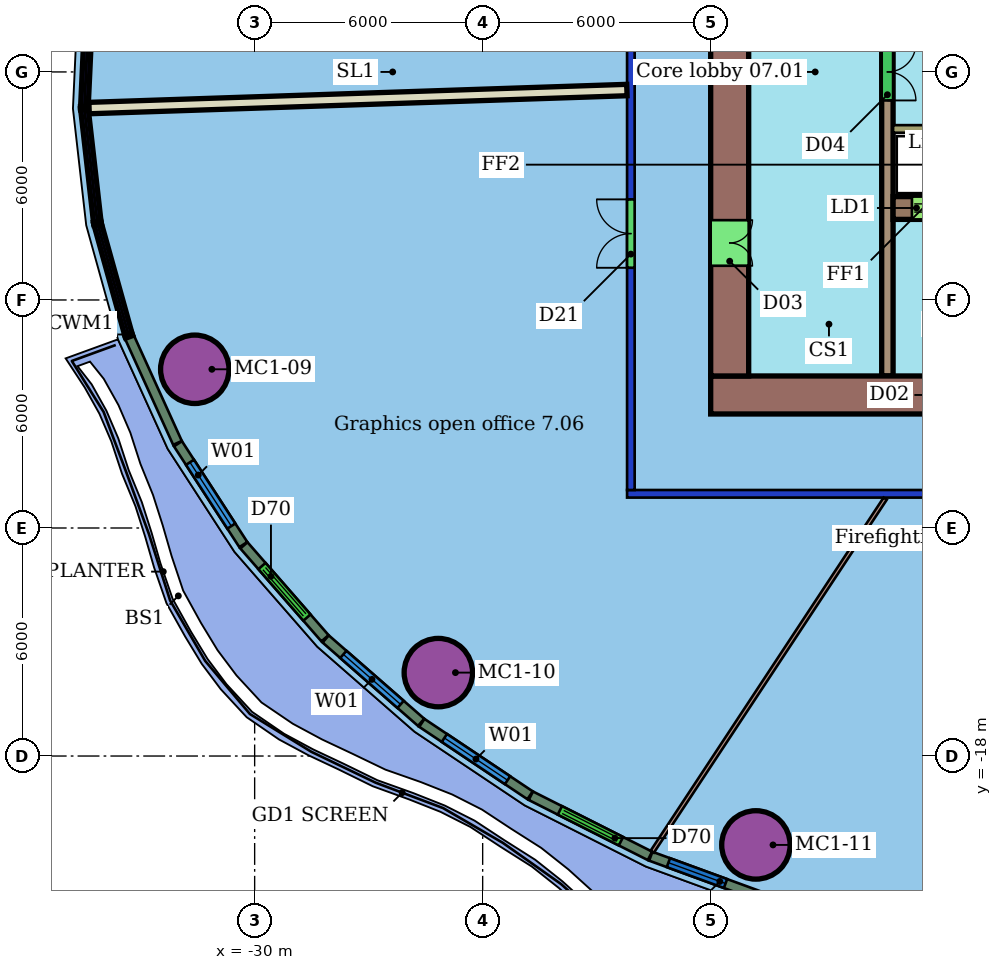
"""IFC4 building model, lengths in metres.
Left out: names, types, materials, properties, quantities, classifications, styles, units other than length and angle.
Written with IfcOpenShell. Run it as: python <this file> out.ifc"""

import sys

from ifc_helpers import new_model, si_unit, direction, frame, frame_2d, origin, origin_2d, place, context, subcontext, project, spatial, rectangle, hollow_circle, extrude, element, fill, save


model = new_model("IFC4")
c1 = context("Model", 3, precision=1e-05, world=origin(), true_north=direction((0.0, 1.0)))
c2 = subcontext(c1, "Body", "Model", "MODEL_VIEW")
j1 = project(units=[si_unit("LENGTHUNIT", "METRE"), si_unit("PLANEANGLEUNIT", "RADIAN")], contexts=[c1])
p1 = place(None, origin())
s1 = spatial("IfcSite", under=j1, at=p1, CompositionType="ELEMENT")
p2 = place(p1, origin())
s2 = spatial("IfcBuilding", under=s1, at=p2, CompositionType="ELEMENT")
p3 = place(p2, frame((0.0, 0.0, 43.4)))
s3 = spatial("IfcBuildingStorey", under=s2, at=p3, CompositionType="ELEMENT", Elevation=43.4)
for number, where, z_axis, x_axis in (
    (1, (-31.575, -7.824, 0.0), (0.0, 0.0, 1.0), (1.0, 0.0, 0.0)),
    (2, (-25.166, -15.805, 0.0), (0.0, 0.0, 1.0), (1.0, 0.0, 0.0)),
    (3, (-16.81, -20.339, 0.0), (0.0, 0.0, 1.0), (1.0, 0.0, 0.0)),
):
    element("IfcColumn", number, at=place(p3, frame(where, z_axis=z_axis, x_axis=x_axis)), inside=s3, PredefinedType="COLUMN", context=c2, shape_type="SweptSolid", body=[
        extrude(hollow_circle(Radius=0.9, WallThickness=0.06, at=origin_2d()), origin(), (0.0, 0.0, 1.0), 3.55),
    ])
p4 = place(p3, frame((8.2, -11.1, 0.0), z_axis=(0.0, 0.0, 1.0), x_axis=(-1.0, 0.0, 0.0)))
e4 = element("IfcWall", 4, at=p4, inside=s3, PredefinedType="PARTITIONING", context=c2, shape_type="SweptSolid", body=[
    extrude(rectangle(XDim=28.4, YDim=0.2, at=frame_2d((14.2, 0.0))), origin(), (0.0, 0.0, 1.0), 2.85),
])
p5 = place(p4, frame((11.713, 0.0, 0.0)))
e5 = element("IfcOpeningElement", 5, at=p5, cuts=e4, PredefinedType="OPENING", context=c2, shape_type="SweptSolid", body=[
    extrude(rectangle(XDim=1.8, YDim=2.1, at=frame_2d((0.9, 1.05))), frame((0.0, 0.11, 0.0), z_axis=(0.0, -1.0, 0.0), x_axis=(1.0, 0.0, 0.0)), (0.0, 0.0, 1.0), 0.22),
])
p6 = place(p4, frame((4.186, 0.0, 0.0)))
e6 = element("IfcOpeningElement", 6, at=p6, cuts=e4, PredefinedType="OPENING", context=c2, shape_type="SweptSolid", body=[
    extrude(rectangle(XDim=1.8, YDim=2.1, at=frame_2d((0.9, 1.05))), frame((0.0, 0.11, 0.0), z_axis=(0.0, -1.0, 0.0), x_axis=(1.0, 0.0, 0.0)), (0.0, 0.0, 1.0), 0.22),
])
p7 = place(p3, frame((-20.1, -11.0, 0.0), z_axis=(0.0, 0.0, 1.0), x_axis=(0.0, 1.0, 0.0)))
e7 = element("IfcWall", 7, at=p7, inside=s3, PredefinedType="PARTITIONING", context=c2, shape_type="SweptSolid", body=[
    extrude(rectangle(XDim=22.0, YDim=0.2, at=frame_2d((11.0, 0.0))), origin(), (0.0, 0.0, 1.0), 2.85),
])
p8 = place(p7, frame((12.87, 0.0, 0.0)))
e8 = element("IfcOpeningElement", 8, at=p8, cuts=e7, PredefinedType="OPENING", context=c2, shape_type="SweptSolid", body=[
    extrude(rectangle(XDim=1.1, YDim=2.1, at=frame_2d((0.55, 1.05))), frame((0.0, 0.11, 0.0), z_axis=(0.0, -1.0, 0.0), x_axis=(1.0, 0.0, 0.0)), (0.0, 0.0, 1.0), 0.22),
])
p9 = place(p7, frame((5.847, 0.0, 0.0)))
e9 = element("IfcOpeningElement", 9, at=p9, cuts=e7, PredefinedType="OPENING", context=c2, shape_type="SweptSolid", body=[
    extrude(rectangle(XDim=1.8, YDim=2.1, at=frame_2d((0.9, 1.05))), frame((0.0, 0.11, 0.0), z_axis=(0.0, -1.0, 0.0), x_axis=(1.0, 0.0, 0.0)), (0.0, 0.0, 1.0), 0.22),
])
p10 = place(p3, frame((-34.357, -0.951, 0.0), z_axis=(0.0, 0.0, 1.0), x_axis=(0.999438092699, 0.033518634559, 0.0)))
e10 = element("IfcWall", 10, at=p10, inside=s3, PredefinedType="PARTITIONING", context=c2, shape_type="SweptSolid", body=[
    extrude(rectangle(XDim=14.16, YDim=0.3, at=frame_2d((7.08, 0.0))), origin(), (0.0, 0.0, 1.0), 3.55),
])
p11 = place(p3, frame((-19.537, -20.518, 0.0), z_axis=(0.0, 0.0, 1.0), x_axis=(0.550715074496, 0.834693300993, 0.0)))
e11 = element("IfcWall", 11, at=p11, inside=s3, PredefinedType="PARTITIONING", context=c2, shape_type="SweptSolid", body=[
    extrude(rectangle(XDim=11.13, YDim=0.1, at=frame_2d((5.565, 0.0))), origin(), (0.0, 0.0, 1.0), 3.55),
])
p12 = place(p3, frame((-33.292, -6.983, 0.0), z_axis=(0.0, 0.0, 1.0), x_axis=(0.413441056797, -0.910530885008, 0.0)))
e12 = element("IfcWall", 12, at=p12, inside=s3, PredefinedType="SOLIDWALL", context=c2, shape_type="SweptSolid", body=[
    extrude(rectangle(XDim=3.05, YDim=0.25, at=frame_2d((1.525, 0.0))), origin(), (0.0, 0.0, 1.0), 3.15),
])
p13 = place(p3, frame((-32.018, -9.784, 0.0), z_axis=(0.0, 0.0, 1.0), x_axis=(0.544086790483, -0.839028941349, 0.0)))
e13 = element("IfcWall", 13, at=p13, inside=s3, PredefinedType="SOLIDWALL", context=c2, shape_type="SweptSolid", body=[
    extrude(rectangle(XDim=3.161, YDim=0.25, at=frame_2d((1.581, 0.0))), origin(), (0.0, 0.0, 1.0), 3.15),
])
p14 = place(p13, frame((0.581, 0.0, 0.8)))
e14 = element("IfcOpeningElement", 14, at=p14, cuts=e13, PredefinedType="OPENING", context=c2, shape_type="SweptSolid", body=[
    extrude(rectangle(XDim=2.0, YDim=2.2, at=frame_2d((1.0, 1.1))), frame((0.0, 0.135, 0.0), z_axis=(0.0, -1.0, 0.0), x_axis=(1.0, 0.0, 0.0)), (0.0, 0.0, 1.0), 0.27),
])
p15 = place(p3, frame((-30.282, -12.457, 0.0), z_axis=(0.0, 0.0, 1.0), x_axis=(0.657550554533, -0.753410424824, 0.0)))
e15 = element("IfcWall", 15, at=p15, inside=s3, PredefinedType="SOLIDWALL", context=c2, shape_type="SweptSolid", body=[
    extrude(rectangle(XDim=3.245, YDim=0.25, at=frame_2d((1.622, 0.0))), origin(), (0.0, 0.0, 1.0), 3.15),
])
p16 = place(p15, frame((0.722, 0.0, 0.0)))
e16 = element("IfcOpeningElement", 16, at=p16, cuts=e15, PredefinedType="OPENING", context=c2, shape_type="SweptSolid", body=[
    extrude(rectangle(XDim=1.8, YDim=2.4, at=frame_2d((0.9, 1.2))), frame((0.0, 0.135, 0.0), z_axis=(0.0, -1.0, 0.0), x_axis=(1.0, 0.0, 0.0)), (0.0, 0.0, 1.0), 0.27),
])
p17 = place(p3, frame((-28.131, -14.919, 0.0), z_axis=(0.0, 0.0, 1.0), x_axis=(0.753152288186, -0.657846206039, 0.0)))
e17 = element("IfcWall", 17, at=p17, inside=s3, PredefinedType="SOLIDWALL", context=c2, shape_type="SweptSolid", body=[
    extrude(rectangle(XDim=3.335, YDim=0.25, at=frame_2d((1.667, 0.0))), origin(), (0.0, 0.0, 1.0), 3.15),
])
p18 = place(p17, frame((0.618, 0.0, 0.8)))
e18 = element("IfcOpeningElement", 18, at=p18, cuts=e17, PredefinedType="OPENING", context=c2, shape_type="SweptSolid", body=[
    extrude(rectangle(XDim=2.0, YDim=2.2, at=frame_2d((1.0, 1.1))), frame((0.0, 0.135, 0.0), z_axis=(0.0, -1.0, 0.0), x_axis=(1.0, 0.0, 0.0)), (0.0, 0.0, 1.0), 0.27),
])
p19 = place(p3, frame((-25.6, -17.128, 0.0), z_axis=(0.0, 0.0, 1.0), x_axis=(0.831183264566, -0.555998543798, 0.0)))
e19 = element("IfcWall", 19, at=p19, inside=s3, PredefinedType="SOLIDWALL", context=c2, shape_type="SweptSolid", body=[
    extrude(rectangle(XDim=3.426, YDim=0.25, at=frame_2d((1.713, 0.0))), origin(), (0.0, 0.0, 1.0), 3.15),
])
p20 = place(p19, frame((0.713, 0.0, 0.8)))
e20 = element("IfcOpeningElement", 20, at=p20, cuts=e19, PredefinedType="OPENING", context=c2, shape_type="SweptSolid", body=[
    extrude(rectangle(XDim=2.0, YDim=2.2, at=frame_2d((1.0, 1.1))), frame((0.0, 0.135, 0.0), z_axis=(0.0, -1.0, 0.0), x_axis=(1.0, 0.0, 0.0)), (0.0, 0.0, 1.0), 0.27),
])
p21 = place(p3, frame((-22.732, -19.045, 0.0), z_axis=(0.0, 0.0, 1.0), x_axis=(0.892738680503, -0.450574797712, 0.0)))
e21 = element("IfcWall", 21, at=p21, inside=s3, PredefinedType="SOLIDWALL", context=c2, shape_type="SweptSolid", body=[
    extrude(rectangle(XDim=3.512, YDim=0.25, at=frame_2d((1.756, 0.0))), origin(), (0.0, 0.0, 1.0), 3.15),
])
p22 = place(p21, frame((0.856, 0.0, 0.0)))
e22 = element("IfcOpeningElement", 22, at=p22, cuts=e21, PredefinedType="OPENING", context=c2, shape_type="SweptSolid", body=[
    extrude(rectangle(XDim=1.8, YDim=2.4, at=frame_2d((0.9, 1.2))), frame((0.0, 0.135, 0.0), z_axis=(0.0, -1.0, 0.0), x_axis=(1.0, 0.0, 0.0)), (0.0, 0.0, 1.0), 0.27),
])
p23 = place(p3, frame((-19.576, -20.636, 0.0), z_axis=(0.0, 0.0, 1.0), x_axis=(0.939175868645, -0.343436584766, 0.0)))
e23 = element("IfcWall", 23, at=p23, inside=s3, PredefinedType="SOLIDWALL", context=c2, shape_type="SweptSolid", body=[
    extrude(rectangle(XDim=3.587, YDim=0.25, at=frame_2d((1.793, 0.0))), origin(), (0.0, 0.0, 1.0), 3.15),
])
p24 = place(p23, frame((0.494, 0.0, 0.8)))
e24 = element("IfcOpeningElement", 24, at=p24, cuts=e23, PredefinedType="OPENING", context=c2, shape_type="SweptSolid", body=[
    extrude(rectangle(XDim=1.6, YDim=2.2, at=frame_2d((0.8, 1.1))), frame((0.0, 0.135, 0.0), z_axis=(0.0, -1.0, 0.0), x_axis=(1.0, 0.0, 0.0)), (0.0, 0.0, 1.0), 0.27),
])
p25 = place(p3, frame((-18.0, -8.5, 0.0), z_axis=(0.0, 0.0, 1.0), x_axis=(1.0, 0.0, 0.0)))
e25 = element("IfcWall", 25, at=p25, inside=s3, PredefinedType="SHEAR", context=c2, shape_type="SweptSolid", body=[
    extrude(rectangle(XDim=24.0, YDim=1.0, at=frame_2d((12.0, 0.0))), origin(), (0.0, 0.0, 1.0), 3.4),
])
p26 = place(p25, frame((6.0, 0.0, 0.0)))
e26 = element("IfcOpeningElement", 26, at=p26, cuts=e25, PredefinedType="OPENING", context=c2, shape_type="SweptSolid", body=[
    extrude(rectangle(XDim=1.2, YDim=2.1, at=frame_2d((0.6, 1.05))), frame((0.0, 0.51, 0.0), z_axis=(0.0, -1.0, 0.0), x_axis=(1.0, 0.0, 0.0)), (0.0, 0.0, 1.0), 1.02),
])
p27 = place(p3, frame((-17.5, 8.0, 0.0), z_axis=(0.0, 0.0, 1.0), x_axis=(0.0, -1.0, 0.0)))
e27 = element("IfcWall", 27, at=p27, inside=s3, PredefinedType="SHEAR", context=c2, shape_type="SweptSolid", body=[
    extrude(rectangle(XDim=16.0, YDim=1.0, at=frame_2d((8.0, 0.0))), origin(), (0.0, 0.0, 1.0), 3.4),
])
p28 = place(p27, frame((11.9, 0.0, 0.0)))
e28 = element("IfcOpeningElement", 28, at=p28, cuts=e27, PredefinedType="OPENING", context=c2, shape_type="SweptSolid", body=[
    extrude(rectangle(XDim=1.2, YDim=2.1, at=frame_2d((0.6, 1.05))), frame((0.0, 0.51, 0.0), z_axis=(0.0, -1.0, 0.0), x_axis=(1.0, 0.0, 0.0)), (0.0, 0.0, 1.0), 1.02),
])
p29 = place(p27, frame((2.9, 0.0, 0.0)))
e29 = element("IfcOpeningElement", 29, at=p29, cuts=e27, PredefinedType="OPENING", context=c2, shape_type="SweptSolid", body=[
    extrude(rectangle(XDim=1.2, YDim=2.1, at=frame_2d((0.6, 1.05))), frame((0.0, 0.51, 0.0), z_axis=(0.0, -1.0, 0.0), x_axis=(1.0, 0.0, 0.0)), (0.0, 0.0, 1.0), 1.02),
])
p30 = place(p3, frame((-13.2, -3.58, 0.0), z_axis=(0.0, 0.0, 1.0), x_axis=(1.0, 0.0, 0.0)))
e30 = element("IfcWall", 30, at=p30, inside=s3, PredefinedType="SHEAR", context=c2, shape_type="SweptSolid", body=[
    extrude(rectangle(XDim=7.2, YDim=0.6, at=frame_2d((3.6, 0.0))), origin(), (0.0, 0.0, 1.0), 3.4),
])
p31 = place(p30, frame((0.496, 0.0, 0.0)))
e31 = element("IfcOpeningElement", 31, at=p31, cuts=e30, PredefinedType="OPENING", context=c2, shape_type="SweptSolid", body=[
    extrude(rectangle(XDim=1.2, YDim=2.1, at=frame_2d((0.6, 1.05))), frame((0.0, 0.31, 0.0), z_axis=(0.0, -1.0, 0.0), x_axis=(1.0, 0.0, 0.0)), (0.0, 0.0, 1.0), 0.62),
])
p32 = place(p30, frame((2.938, 0.0, 0.0)))
e32 = element("IfcOpeningElement", 32, at=p32, cuts=e30, PredefinedType="OPENING", context=c2, shape_type="SweptSolid", body=[
    extrude(rectangle(XDim=1.2, YDim=2.1, at=frame_2d((0.6, 1.05))), frame((0.0, 0.31, 0.0), z_axis=(0.0, -1.0, 0.0), x_axis=(1.0, 0.0, 0.0)), (0.0, 0.0, 1.0), 0.62),
])
p33 = place(p3, frame((-13.35, 8.0, 0.0), z_axis=(0.0, 0.0, 1.0), x_axis=(0.0, -1.0, 0.0)))
e33 = element("IfcWall", 33, at=p33, inside=s3, PredefinedType="SHEAR", context=c2, shape_type="SweptSolid", body=[
    extrude(rectangle(XDim=16.0, YDim=0.3, at=frame_2d((8.0, 0.0))), origin(), (0.0, 0.0, 1.0), 3.4),
])
p34 = place(p33, frame((7.25, 0.0, 0.0)))
e34 = element("IfcOpeningElement", 34, at=p34, cuts=e33, PredefinedType="OPENING", context=c2, shape_type="SweptSolid", body=[
    extrude(rectangle(XDim=1.5, YDim=2.1, at=frame_2d((0.75, 1.05))), frame((0.0, 0.16, 0.0), z_axis=(0.0, -1.0, 0.0), x_axis=(1.0, 0.0, 0.0)), (0.0, 0.0, 1.0), 0.32),
])
p35 = place(p3, frame((1.2, -1.5, 0.0), z_axis=(0.0, 0.0, 1.0), x_axis=(-1.0, 0.0, 0.0)))
e35 = element("IfcWall", 35, at=p35, inside=s3, PredefinedType="SHEAR", context=c2, shape_type="SweptSolid", body=[
    extrude(rectangle(XDim=14.4, YDim=0.2, at=frame_2d((7.2, 0.0))), origin(), (0.0, 0.0, 1.0), 3.4),
])
p36 = place(p35, frame((7.821, 0.0, 0.0)))
e36 = element("IfcOpeningElement", 36, at=p36, cuts=e35, PredefinedType="OPENING", context=c2, shape_type="SweptSolid", body=[
    extrude(rectangle(XDim=1.2, YDim=2.1, at=frame_2d((0.6, 1.05))), frame((0.0, 0.11, 0.0), z_axis=(0.0, -1.0, 0.0), x_axis=(1.0, 0.0, 0.0)), (0.0, 0.0, 1.0), 0.22),
])
p37 = place(p35, frame((0.15, 0.0, 0.0)))
e37 = element("IfcOpeningElement", 37, at=p37, cuts=e35, PredefinedType="OPENING", context=c2, shape_type="SweptSolid", body=[
    extrude(rectangle(XDim=0.9, YDim=2.1, at=frame_2d((0.45, 1.05))), frame((0.0, 0.11, 0.0), z_axis=(0.0, -1.0, 0.0), x_axis=(1.0, 0.0, 0.0)), (0.0, 0.0, 1.0), 0.22),
])
p38 = place(p9, origin())
e38 = element("IfcDoor", 38, at=p38, inside=s3, OperationType="DOUBLE_DOOR_SINGLE_SWING", PredefinedType="DOOR", context=c2, shape_type="SweptSolid", body=[
    extrude(rectangle(XDim=1.8, YDim=2.1, at=frame_2d((0.9, 1.05))), frame((0.0, 0.025, 0.0), z_axis=(0.0, -1.0, 0.0), x_axis=(1.0, 0.0, 0.0)), (0.0, 0.0, 1.0), 0.05),
])
fill(e9, e38)
p39 = place(p14, origin())
e39 = element("IfcWindow", 39, at=p39, inside=s3, PartitioningType="SINGLE_PANEL", PredefinedType="WINDOW", context=c2, shape_type="SweptSolid", body=[
    extrude(rectangle(XDim=2.0, YDim=2.2, at=frame_2d((1.0, 1.1))), frame((0.0, 0.03, 0.0), z_axis=(0.0, -1.0, 0.0), x_axis=(1.0, 0.0, 0.0)), (0.0, 0.0, 1.0), 0.06),
])
fill(e14, e39)
p40 = place(p16, origin())
e40 = element("IfcDoor", 40, at=p40, inside=s3, OperationType="DOUBLE_DOOR_SLIDING", PredefinedType="DOOR", context=c2, shape_type="SweptSolid", body=[
    extrude(rectangle(XDim=1.8, YDim=2.4, at=frame_2d((0.9, 1.2))), frame((0.0, 0.025, 0.0), z_axis=(0.0, -1.0, 0.0), x_axis=(1.0, 0.0, 0.0)), (0.0, 0.0, 1.0), 0.05),
])
fill(e16, e40)
p41 = place(p18, origin())
e41 = element("IfcWindow", 41, at=p41, inside=s3, PartitioningType="SINGLE_PANEL", PredefinedType="WINDOW", context=c2, shape_type="SweptSolid", body=[
    extrude(rectangle(XDim=2.0, YDim=2.2, at=frame_2d((1.0, 1.1))), frame((0.0, 0.03, 0.0), z_axis=(0.0, -1.0, 0.0), x_axis=(1.0, 0.0, 0.0)), (0.0, 0.0, 1.0), 0.06),
])
fill(e18, e41)
p42 = place(p20, origin())
e42 = element("IfcWindow", 42, at=p42, inside=s3, PartitioningType="SINGLE_PANEL", PredefinedType="WINDOW", context=c2, shape_type="SweptSolid", body=[
    extrude(rectangle(XDim=2.0, YDim=2.2, at=frame_2d((1.0, 1.1))), frame((0.0, 0.03, 0.0), z_axis=(0.0, -1.0, 0.0), x_axis=(1.0, 0.0, 0.0)), (0.0, 0.0, 1.0), 0.06),
])
fill(e20, e42)
p43 = place(p22, origin())
e43 = element("IfcDoor", 43, at=p43, inside=s3, OperationType="DOUBLE_DOOR_SLIDING", PredefinedType="DOOR", context=c2, shape_type="SweptSolid", body=[
    extrude(rectangle(XDim=1.8, YDim=2.4, at=frame_2d((0.9, 1.2))), frame((0.0, 0.025, 0.0), z_axis=(0.0, -1.0, 0.0), x_axis=(1.0, 0.0, 0.0)), (0.0, 0.0, 1.0), 0.05),
])
fill(e22, e43)
p44 = place(p24, origin())
e44 = element("IfcWindow", 44, at=p44, inside=s3, PartitioningType="SINGLE_PANEL", PredefinedType="WINDOW", context=c2, shape_type="SweptSolid", body=[
    extrude(rectangle(XDim=1.6, YDim=2.2, at=frame_2d((0.8, 1.1))), frame((0.0, 0.03, 0.0), z_axis=(0.0, -1.0, 0.0), x_axis=(1.0, 0.0, 0.0)), (0.0, 0.0, 1.0), 0.06),
])
fill(e24, e44)
p45 = place(p28, origin())
e45 = element("IfcDoor", 45, at=p45, inside=s3, OperationType="DOUBLE_DOOR_SINGLE_SWING", PredefinedType="NOTDEFINED", context=c2, shape_type="SweptSolid", body=[
    extrude(rectangle(XDim=1.2, YDim=2.1, at=frame_2d((0.6, 1.05))), frame((0.0, 0.025, 0.0), z_axis=(0.0, -1.0, 0.0), x_axis=(1.0, 0.0, 0.0)), (0.0, 0.0, 1.0), 0.05),
])
fill(e28, e45)
p46 = place(p31, origin())
e46 = element("IfcDoor", 46, at=p46, inside=s3, OperationType="DOUBLE_DOOR_SLIDING", PredefinedType="NOTDEFINED", context=c2, shape_type="SweptSolid", body=[
    extrude(rectangle(XDim=1.2, YDim=2.1, at=frame_2d((0.6, 1.05))), frame((0.0, 0.025, 0.0), z_axis=(0.0, -1.0, 0.0), x_axis=(1.0, 0.0, 0.0)), (0.0, 0.0, 1.0), 0.05),
])
fill(e31, e46)
p47 = place(p34, origin())
e47 = element("IfcDoor", 47, at=p47, inside=s3, OperationType="DOUBLE_DOOR_SINGLE_SWING", PredefinedType="NOTDEFINED", context=c2, shape_type="SweptSolid", body=[
    extrude(rectangle(XDim=1.5, YDim=2.1, at=frame_2d((0.75, 1.05))), frame((0.0, 0.025, 0.0), z_axis=(0.0, -1.0, 0.0), x_axis=(1.0, 0.0, 0.0)), (0.0, 0.0, 1.0), 0.05),
])
fill(e34, e47)
save(model, sys.argv[1])
